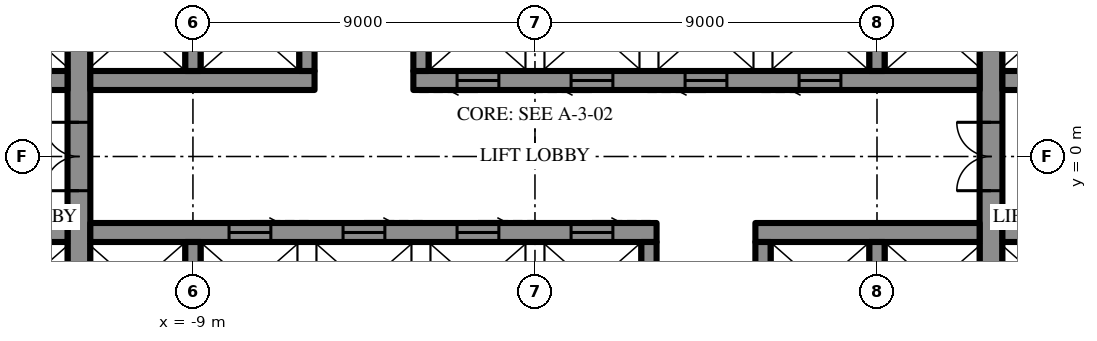
"""IFC4 building model, lengths in metres.
Left out: names, types, materials, properties, quantities, classifications, styles, units other than length and angle.
Written with IfcOpenShell. Run it as: python <this file> out.ifc"""

import sys

from ifc_helpers import new_model, si_unit, direction, frame, frame_2d, origin, place, context, subcontext, project, spatial, rectangle, extrude, element, fill, save


model = new_model("IFC4")
c1 = context("Model", 3, precision=1e-05, world=origin(), true_north=direction((0.0, 1.0)))
c2 = subcontext(c1, "Body", "Model", "MODEL_VIEW")
j1 = project(units=[si_unit("LENGTHUNIT", "METRE"), si_unit("PLANEANGLEUNIT", "RADIAN")], contexts=[c1])
p1 = place(None, origin())
s1 = spatial("IfcSite", under=j1, at=p1, CompositionType="ELEMENT")
p2 = place(p1, origin())
s2 = spatial("IfcBuilding", under=s1, at=p2, CompositionType="ELEMENT")
p3 = place(p2, frame((0.0, 0.0, 127.9)))
s3 = spatial("IfcBuildingStorey", under=s2, at=p3, CompositionType="ELEMENT", Elevation=127.9)
p4 = place(p3, frame((12.0, -10.7, 0.0), z_axis=(0.0, 0.0, 1.0), x_axis=(0.0, 1.0, 0.0)))
e1 = element("IfcWall", 1, at=p4, inside=s3, PredefinedType="SHEAR", context=c2, shape_type="SweptSolid", body=[
    extrude(rectangle(XDim=21.4, YDim=0.6, at=frame_2d((10.7, 0.0))), origin(), (0.0, 0.0, 1.0), 4.2),
])
p5 = place(p4, frame((9.8, 0.0, 0.0)))
e2 = element("IfcOpeningElement", 2, at=p5, cuts=e1, PredefinedType="OPENING", context=c2, shape_type="SweptSolid", body=[
    extrude(rectangle(XDim=1.8, YDim=2.4, at=frame_2d((0.9, 1.2))), frame((0.0, 0.31, 0.0), z_axis=(0.0, -1.0, 0.0), x_axis=(1.0, 0.0, 0.0)), (0.0, 0.0, 1.0), 0.62),
])
p6 = place(p3, frame((-12.0, -10.7, 0.0), z_axis=(0.0, 0.0, 1.0), x_axis=(0.0, 1.0, 0.0)))
e3 = element("IfcWall", 3, at=p6, inside=s3, PredefinedType="SHEAR", context=c2, shape_type="SweptSolid", body=[
    extrude(rectangle(XDim=21.4, YDim=0.6, at=frame_2d((10.7, 0.0))), origin(), (0.0, 0.0, 1.0), 4.2),
])
p7 = place(p6, frame((9.8, 0.0, 0.0)))
e4 = element("IfcOpeningElement", 4, at=p7, cuts=e3, PredefinedType="OPENING", context=c2, shape_type="SweptSolid", body=[
    extrude(rectangle(XDim=1.8, YDim=2.4, at=frame_2d((0.9, 1.2))), frame((0.0, 0.31, 0.0), z_axis=(0.0, -1.0, 0.0), x_axis=(1.0, 0.0, 0.0)), (0.0, 0.0, 1.0), 0.62),
])
p8 = place(p3, frame((-14.7, 2.0, 0.0), z_axis=(0.0, 0.0, 1.0), x_axis=(1.0, 0.0, 0.0)))
e5 = element("IfcWall", 5, at=p8, inside=s3, PredefinedType="SHEAR", context=c2, shape_type="SweptSolid", body=[
    extrude(rectangle(XDim=2.4, YDim=0.5, at=frame_2d((1.2, 0.0))), origin(), (0.0, 0.0, 1.0), 4.2),
])
p9 = place(p3, frame((-11.7, 2.0, 0.0), z_axis=(0.0, 0.0, 1.0), x_axis=(1.0, 0.0, 0.0)))
e6 = element("IfcWall", 6, at=p9, inside=s3, PredefinedType="SHEAR", context=c2, shape_type="SweptSolid", body=[
    extrude(rectangle(XDim=5.9, YDim=0.5, at=frame_2d((2.95, 0.0))), origin(), (0.0, 0.0, 1.0), 4.2),
])
p10 = place(p3, frame((-3.2, 2.0, 0.0), z_axis=(0.0, 0.0, 1.0), x_axis=(1.0, 0.0, 0.0)))
e7 = element("IfcWall", 7, at=p10, inside=s3, PredefinedType="SHEAR", context=c2, shape_type="SweptSolid", body=[
    extrude(rectangle(XDim=14.9, YDim=0.5, at=frame_2d((7.45, 0.0))), origin(), (0.0, 0.0, 1.0), 4.2),
])
p11 = place(p10, frame((1.15, 0.0, 0.0)))
e8 = element("IfcOpeningElement", 8, at=p11, cuts=e7, PredefinedType="OPENING", context=c2, shape_type="SweptSolid", body=[
    extrude(rectangle(XDim=1.1, YDim=2.2, at=frame_2d((0.55, 1.1))), frame((0.0, 0.26, 0.0), z_axis=(0.0, -1.0, 0.0), x_axis=(1.0, 0.0, 0.0)), (0.0, 0.0, 1.0), 0.52),
])
p12 = place(p10, frame((4.15, 0.0, 0.0)))
e9 = element("IfcOpeningElement", 9, at=p12, cuts=e7, PredefinedType="OPENING", context=c2, shape_type="SweptSolid", body=[
    extrude(rectangle(XDim=1.1, YDim=2.2, at=frame_2d((0.55, 1.1))), frame((0.0, 0.26, 0.0), z_axis=(0.0, -1.0, 0.0), x_axis=(1.0, 0.0, 0.0)), (0.0, 0.0, 1.0), 0.52),
])
p13 = place(p10, frame((7.15, 0.0, 0.0)))
e10 = element("IfcOpeningElement", 10, at=p13, cuts=e7, PredefinedType="OPENING", context=c2, shape_type="SweptSolid", body=[
    extrude(rectangle(XDim=1.1, YDim=2.2, at=frame_2d((0.55, 1.1))), frame((0.0, 0.26, 0.0), z_axis=(0.0, -1.0, 0.0), x_axis=(1.0, 0.0, 0.0)), (0.0, 0.0, 1.0), 0.52),
])
p14 = place(p10, frame((10.15, 0.0, 0.0)))
e11 = element("IfcOpeningElement", 11, at=p14, cuts=e7, PredefinedType="OPENING", context=c2, shape_type="SweptSolid", body=[
    extrude(rectangle(XDim=1.1, YDim=2.2, at=frame_2d((0.55, 1.1))), frame((0.0, 0.26, 0.0), z_axis=(0.0, -1.0, 0.0), x_axis=(1.0, 0.0, 0.0)), (0.0, 0.0, 1.0), 0.52),
])
p15 = place(p3, frame((12.3, 2.0, 0.0), z_axis=(0.0, 0.0, 1.0), x_axis=(1.0, 0.0, 0.0)))
e12 = element("IfcWall", 12, at=p15, inside=s3, PredefinedType="SHEAR", context=c2, shape_type="SweptSolid", body=[
    extrude(rectangle(XDim=2.4, YDim=0.5, at=frame_2d((1.2, 0.0))), origin(), (0.0, 0.0, 1.0), 4.2),
])
for number, where, z_axis, x_axis in (
    (13, (-9.0, 2.25, 0.0), (0.0, 0.0, 1.0), (0.0, 1.0, 0.0)),
    (14, (-6.0, 2.25, 0.0), (0.0, 0.0, 1.0), (0.0, 1.0, 0.0)),
    (15, (-3.0, 2.25, 0.0), (0.0, 0.0, 1.0), (0.0, 1.0, 0.0)),
    (16, (9.0, 2.25, 0.0), (0.0, 0.0, 1.0), (0.0, 1.0, 0.0)),
):
    element("IfcWall", number, at=place(p3, frame(where, z_axis=z_axis, x_axis=x_axis)), inside=s3, PredefinedType="SHEAR", context=c2, shape_type="SweptSolid", body=[
        extrude(rectangle(XDim=2.3, YDim=0.4, at=frame_2d((1.15, 0.0))), origin(), (0.0, 0.0, 1.0), 4.2),
    ])
p16 = place(p3, frame((14.7, -2.0, 0.0), z_axis=(0.0, 0.0, 1.0), x_axis=(-1.0, 0.0, 0.0)))
e17 = element("IfcWall", 17, at=p16, inside=s3, PredefinedType="SHEAR", context=c2, shape_type="SweptSolid", body=[
    extrude(rectangle(XDim=2.4, YDim=0.5, at=frame_2d((1.2, 0.0))), origin(), (0.0, 0.0, 1.0), 4.2),
])
p17 = place(p3, frame((11.7, -2.0, 0.0), z_axis=(0.0, 0.0, 1.0), x_axis=(-1.0, 0.0, 0.0)))
e18 = element("IfcWall", 18, at=p17, inside=s3, PredefinedType="SHEAR", context=c2, shape_type="SweptSolid", body=[
    extrude(rectangle(XDim=5.9, YDim=0.5, at=frame_2d((2.95, 0.0))), origin(), (0.0, 0.0, 1.0), 4.2),
])
p18 = place(p3, frame((3.2, -2.0, 0.0), z_axis=(0.0, 0.0, 1.0), x_axis=(-1.0, 0.0, 0.0)))
e19 = element("IfcWall", 19, at=p18, inside=s3, PredefinedType="SHEAR", context=c2, shape_type="SweptSolid", body=[
    extrude(rectangle(XDim=14.9, YDim=0.5, at=frame_2d((7.45, 0.0))), origin(), (0.0, 0.0, 1.0), 4.2),
])
p19 = place(p18, frame((1.15, 0.0, 0.0)))
e20 = element("IfcOpeningElement", 20, at=p19, cuts=e19, PredefinedType="OPENING", context=c2, shape_type="SweptSolid", body=[
    extrude(rectangle(XDim=1.1, YDim=2.2, at=frame_2d((0.55, 1.1))), frame((0.0, 0.26, 0.0), z_axis=(0.0, -1.0, 0.0), x_axis=(1.0, 0.0, 0.0)), (0.0, 0.0, 1.0), 0.52),
])
p20 = place(p18, frame((4.15, 0.0, 0.0)))
e21 = element("IfcOpeningElement", 21, at=p20, cuts=e19, PredefinedType="OPENING", context=c2, shape_type="SweptSolid", body=[
    extrude(rectangle(XDim=1.1, YDim=2.2, at=frame_2d((0.55, 1.1))), frame((0.0, 0.26, 0.0), z_axis=(0.0, -1.0, 0.0), x_axis=(1.0, 0.0, 0.0)), (0.0, 0.0, 1.0), 0.52),
])
p21 = place(p18, frame((7.15, 0.0, 0.0)))
e22 = element("IfcOpeningElement", 22, at=p21, cuts=e19, PredefinedType="OPENING", context=c2, shape_type="SweptSolid", body=[
    extrude(rectangle(XDim=1.1, YDim=2.2, at=frame_2d((0.55, 1.1))), frame((0.0, 0.26, 0.0), z_axis=(0.0, -1.0, 0.0), x_axis=(1.0, 0.0, 0.0)), (0.0, 0.0, 1.0), 0.52),
])
p22 = place(p18, frame((10.15, 0.0, 0.0)))
e23 = element("IfcOpeningElement", 23, at=p22, cuts=e19, PredefinedType="OPENING", context=c2, shape_type="SweptSolid", body=[
    extrude(rectangle(XDim=1.1, YDim=2.2, at=frame_2d((0.55, 1.1))), frame((0.0, 0.26, 0.0), z_axis=(0.0, -1.0, 0.0), x_axis=(1.0, 0.0, 0.0)), (0.0, 0.0, 1.0), 0.52),
])
p23 = place(p3, frame((-12.3, -2.0, 0.0), z_axis=(0.0, 0.0, 1.0), x_axis=(-1.0, 0.0, 0.0)))
e24 = element("IfcWall", 24, at=p23, inside=s3, PredefinedType="SHEAR", context=c2, shape_type="SweptSolid", body=[
    extrude(rectangle(XDim=2.4, YDim=0.5, at=frame_2d((1.2, 0.0))), origin(), (0.0, 0.0, 1.0), 4.2),
])
for number, where, z_axis, x_axis in (
    (25, (9.0, -2.25, 0.0), (0.0, 0.0, 1.0), (0.0, -1.0, 0.0)),
    (26, (6.0, -2.25, 0.0), (0.0, 0.0, 1.0), (0.0, -1.0, 0.0)),
    (27, (3.0, -2.25, 0.0), (0.0, 0.0, 1.0), (0.0, -1.0, 0.0)),
    (28, (-9.0, -2.25, 0.0), (0.0, 0.0, 1.0), (0.0, -1.0, 0.0)),
):
    element("IfcWall", number, at=place(p3, frame(where, z_axis=z_axis, x_axis=x_axis)), inside=s3, PredefinedType="SHEAR", context=c2, shape_type="SweptSolid", body=[
        extrude(rectangle(XDim=2.3, YDim=0.4, at=frame_2d((1.15, 0.0))), origin(), (0.0, 0.0, 1.0), 4.2),
    ])
p24 = place(p5, origin())
e29 = element("IfcDoor", 29, at=p24, inside=s3, OperationType="DOUBLE_DOOR_SINGLE_SWING", PredefinedType="DOOR", context=c2, shape_type="SweptSolid", body=[
    extrude(rectangle(XDim=1.8, YDim=2.4, at=frame_2d((0.9, 1.2))), frame((0.0, 0.025, 0.0), z_axis=(0.0, -1.0, 0.0), x_axis=(1.0, 0.0, 0.0)), (0.0, 0.0, 1.0), 0.05),
])
fill(e2, e29)
p25 = place(p7, origin())
e30 = element("IfcDoor", 30, at=p25, inside=s3, OperationType="DOUBLE_DOOR_SINGLE_SWING", PredefinedType="DOOR", context=c2, shape_type="SweptSolid", body=[
    extrude(rectangle(XDim=1.8, YDim=2.4, at=frame_2d((0.9, 1.2))), frame((0.0, 0.025, 0.0), z_axis=(0.0, -1.0, 0.0), x_axis=(1.0, 0.0, 0.0)), (0.0, 0.0, 1.0), 0.05),
])
fill(e4, e30)
p26 = place(p11, frame((1.1, 0.0, 0.0), z_axis=(0.0, 0.0, 1.0), x_axis=(-1.0, 0.0, 0.0)))
e31 = element("IfcDoor", 31, at=p26, inside=s3, OperationType="SLIDING_TO_LEFT", PredefinedType="DOOR", context=c2, shape_type="SweptSolid", body=[
    extrude(rectangle(XDim=1.1, YDim=2.2, at=frame_2d((0.55, 1.1))), frame((0.0, 0.025, 0.0), z_axis=(0.0, -1.0, 0.0), x_axis=(1.0, 0.0, 0.0)), (0.0, 0.0, 1.0), 0.05),
])
fill(e8, e31)
p27 = place(p12, frame((1.1, 0.0, 0.0), z_axis=(0.0, 0.0, 1.0), x_axis=(-1.0, 0.0, 0.0)))
e32 = element("IfcDoor", 32, at=p27, inside=s3, OperationType="SLIDING_TO_LEFT", PredefinedType="DOOR", context=c2, shape_type="SweptSolid", body=[
    extrude(rectangle(XDim=1.1, YDim=2.2, at=frame_2d((0.55, 1.1))), frame((0.0, 0.025, 0.0), z_axis=(0.0, -1.0, 0.0), x_axis=(1.0, 0.0, 0.0)), (0.0, 0.0, 1.0), 0.05),
])
fill(e9, e32)
p28 = place(p13, frame((1.1, 0.0, 0.0), z_axis=(0.0, 0.0, 1.0), x_axis=(-1.0, 0.0, 0.0)))
e33 = element("IfcDoor", 33, at=p28, inside=s3, OperationType="SLIDING_TO_LEFT", PredefinedType="DOOR", context=c2, shape_type="SweptSolid", body=[
    extrude(rectangle(XDim=1.1, YDim=2.2, at=frame_2d((0.55, 1.1))), frame((0.0, 0.025, 0.0), z_axis=(0.0, -1.0, 0.0), x_axis=(1.0, 0.0, 0.0)), (0.0, 0.0, 1.0), 0.05),
])
fill(e10, e33)
p29 = place(p14, frame((1.1, 0.0, 0.0), z_axis=(0.0, 0.0, 1.0), x_axis=(-1.0, 0.0, 0.0)))
e34 = element("IfcDoor", 34, at=p29, inside=s3, OperationType="SLIDING_TO_LEFT", PredefinedType="DOOR", context=c2, shape_type="SweptSolid", body=[
    extrude(rectangle(XDim=1.1, YDim=2.2, at=frame_2d((0.55, 1.1))), frame((0.0, 0.025, 0.0), z_axis=(0.0, -1.0, 0.0), x_axis=(1.0, 0.0, 0.0)), (0.0, 0.0, 1.0), 0.05),
])
fill(e11, e34)
p30 = place(p19, frame((1.1, 0.0, 0.0), z_axis=(0.0, 0.0, 1.0), x_axis=(-1.0, 0.0, 0.0)))
e35 = element("IfcDoor", 35, at=p30, inside=s3, OperationType="SLIDING_TO_LEFT", PredefinedType="DOOR", context=c2, shape_type="SweptSolid", body=[
    extrude(rectangle(XDim=1.1, YDim=2.2, at=frame_2d((0.55, 1.1))), frame((0.0, 0.025, 0.0), z_axis=(0.0, -1.0, 0.0), x_axis=(1.0, 0.0, 0.0)), (0.0, 0.0, 1.0), 0.05),
])
fill(e20, e35)
p31 = place(p20, frame((1.1, 0.0, 0.0), z_axis=(0.0, 0.0, 1.0), x_axis=(-1.0, 0.0, 0.0)))
e36 = element("IfcDoor", 36, at=p31, inside=s3, OperationType="SLIDING_TO_LEFT", PredefinedType="DOOR", context=c2, shape_type="SweptSolid", body=[
    extrude(rectangle(XDim=1.1, YDim=2.2, at=frame_2d((0.55, 1.1))), frame((0.0, 0.025, 0.0), z_axis=(0.0, -1.0, 0.0), x_axis=(1.0, 0.0, 0.0)), (0.0, 0.0, 1.0), 0.05),
])
fill(e21, e36)
p32 = place(p21, frame((1.1, 0.0, 0.0), z_axis=(0.0, 0.0, 1.0), x_axis=(-1.0, 0.0, 0.0)))
e37 = element("IfcDoor", 37, at=p32, inside=s3, OperationType="SLIDING_TO_LEFT", PredefinedType="DOOR", context=c2, shape_type="SweptSolid", body=[
    extrude(rectangle(XDim=1.1, YDim=2.2, at=frame_2d((0.55, 1.1))), frame((0.0, 0.025, 0.0), z_axis=(0.0, -1.0, 0.0), x_axis=(1.0, 0.0, 0.0)), (0.0, 0.0, 1.0), 0.05),
])
fill(e22, e37)
p33 = place(p22, frame((1.1, 0.0, 0.0), z_axis=(0.0, 0.0, 1.0), x_axis=(-1.0, 0.0, 0.0)))
e38 = element("IfcDoor", 38, at=p33, inside=s3, OperationType="SLIDING_TO_LEFT", PredefinedType="DOOR", context=c2, shape_type="SweptSolid", body=[
    extrude(rectangle(XDim=1.1, YDim=2.2, at=frame_2d((0.55, 1.1))), frame((0.0, 0.025, 0.0), z_axis=(0.0, -1.0, 0.0), x_axis=(1.0, 0.0, 0.0)), (0.0, 0.0, 1.0), 0.05),
])
fill(e23, e38)
save(model, sys.argv[1])
